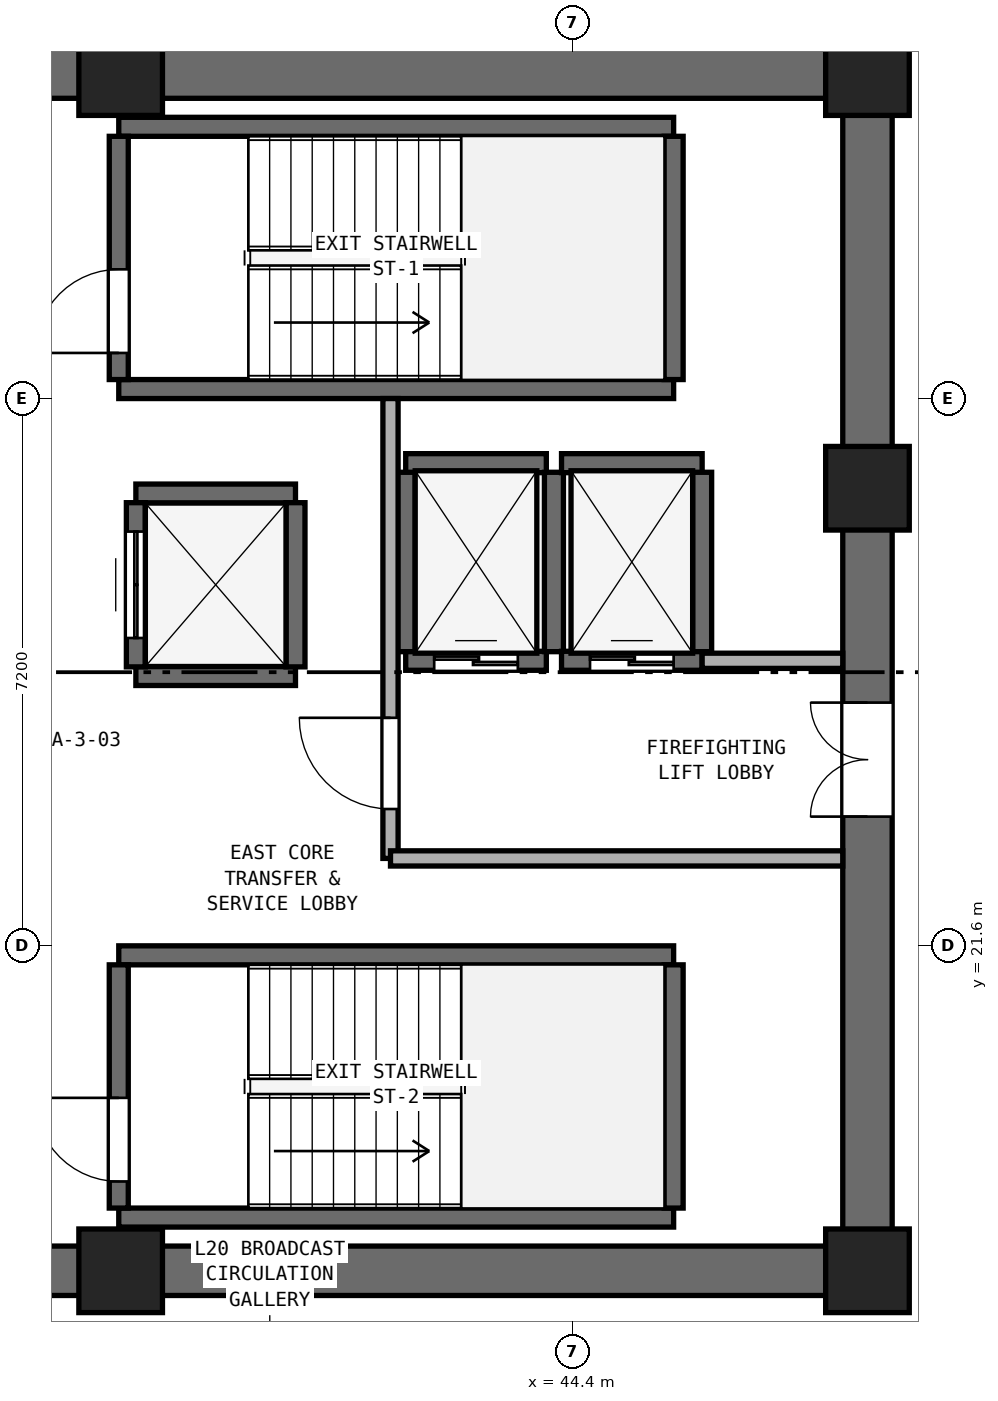
"""IFC4 building model, lengths in metres.
Left out: names, types, materials, properties, quantities, classifications, styles, units other than length and angle.
Written with IfcOpenShell. Run it as: python <this file> out.ifc"""

import sys

from ifc_helpers import new_model, si_unit, direction, frame, frame_2d, origin, origin_2d, place, context, subcontext, project, spatial, rectangle, extrude, element, fill, save


model = new_model("IFC4")
c1 = context("Model", 3, precision=1e-05, world=origin(), true_north=direction((0.0, 1.0)))
c2 = subcontext(c1, "Body", "Model", "MODEL_VIEW")
j1 = project(units=[si_unit("LENGTHUNIT", "METRE"), si_unit("PLANEANGLEUNIT", "RADIAN")], contexts=[c1])
p1 = place(None, origin())
s1 = spatial("IfcSite", under=j1, at=p1, CompositionType="ELEMENT")
p2 = place(p1, origin())
s2 = spatial("IfcBuilding", under=s1, at=p2, CompositionType="ELEMENT")
p3 = place(p2, frame((0.0, 0.0, 82.0)))
s3 = spatial("IfcBuildingStorey", under=s2, at=p3, CompositionType="ELEMENT", Elevation=82.0)
for number, where, z_axis, x_axis in (
    (1, (25.4, 17.325, 0.0), (0.0, 0.0, 1.0), (1.0, 0.0, 0.0)),
    (2, (25.4, 33.075, 0.0), (0.0, 0.0, 1.0), (1.0, 0.0, 0.0)),
):
    element("IfcWall", number, at=place(p3, frame(where, z_axis=z_axis, x_axis=x_axis)), inside=s3, PredefinedType="SHEAR", context=c2, shape_type="SweptSolid", body=[
        extrude(rectangle(XDim=23.2, YDim=0.65, at=frame_2d((11.6, 0.0))), origin(), (0.0, 0.0, 1.0), 3.525),
    ])
p4 = place(p3, frame((48.275, 17.65, 0.0), z_axis=(0.0, 0.0, 1.0), x_axis=(0.0, 1.0, 0.0)))
e3 = element("IfcWall", 3, at=p4, inside=s3, PredefinedType="SHEAR", context=c2, shape_type="SweptSolid", body=[
    extrude(rectangle(XDim=15.1, YDim=0.65, at=frame_2d((7.55, 0.0))), origin(), (0.0, 0.0, 1.0), 3.525),
])
p5 = place(p4, frame((5.65, 0.0, 0.0)))
e4 = element("IfcOpeningElement", 4, at=p5, cuts=e3, PredefinedType="OPENING", context=c2, shape_type="SweptSolid", body=[
    extrude(rectangle(XDim=1.5, YDim=2.15, at=frame_2d((0.75, 1.075))), frame((0.0, 0.335, 0.0), z_axis=(0.0, -1.0, 0.0), x_axis=(1.0, 0.0, 0.0)), (0.0, 0.0, 1.0), 0.67),
])
for number, where, z_axis, x_axis in (
    (5, (38.45, 17.325, 0.0), (0.0, 0.0, 1.0), (1.0, 0.0, 0.0)),
    (6, (48.275, 17.325, 0.0), (0.0, 0.0, 1.0), (1.0, 0.0, 0.0)),
    (7, (48.275, 27.62, 0.0), (0.0, 0.0, 1.0), (1.0, 0.0, 0.0)),
    (8, (48.275, 33.075, 0.0), (0.0, 0.0, 1.0), (1.0, 0.0, 0.0)),
    (9, (38.45, 33.075, 0.0), (0.0, 0.0, 1.0), (1.0, 0.0, 0.0)),
):
    element("IfcColumn", number, at=place(p3, frame(where, z_axis=z_axis, x_axis=x_axis)), inside=s3, PredefinedType="PILASTER", context=c2, shape_type="SweptSolid", body=[
        extrude(rectangle(XDim=1.1, YDim=1.1, at=origin_2d()), origin(), (0.0, 0.0, 1.0), 3.8),
    ])
for number, where, z_axis, x_axis in (
    (10, (38.425, 28.925, 0.0), (0.0, 0.0, 1.0), (1.0, 0.0, 0.0)),
    (11, (38.425, 32.375, 0.0), (0.0, 0.0, 1.0), (1.0, 0.0, 0.0)),
):
    element("IfcWall", number, at=place(p3, frame(where, z_axis=z_axis, x_axis=x_axis)), inside=s3, PredefinedType="SHEAR", context=c2, shape_type="SweptSolid", body=[
        extrude(rectangle(XDim=7.3, YDim=0.25, at=frame_2d((3.65, 0.0))), origin(), (0.0, 0.0, 1.0), 3.525),
    ])
p6 = place(p3, frame((38.425, 29.05, 0.0), z_axis=(0.0, 0.0, 1.0), x_axis=(0.0, 1.0, 0.0)))
e12 = element("IfcWall", 12, at=p6, inside=s3, PredefinedType="SHEAR", context=c2, shape_type="SweptSolid", body=[
    extrude(rectangle(XDim=3.2, YDim=0.25, at=frame_2d((1.6, 0.0))), origin(), (0.0, 0.0, 1.0), 3.525),
])
p7 = place(p6, frame((0.35, 0.0, 0.0)))
e13 = element("IfcOpeningElement", 13, at=p7, cuts=e12, PredefinedType="OPENING", context=c2, shape_type="SweptSolid", body=[
    extrude(rectangle(XDim=1.1, YDim=2.15, at=frame_2d((0.55, 1.075))), frame((0.0, 0.135, 0.0), z_axis=(0.0, -1.0, 0.0), x_axis=(1.0, 0.0, 0.0)), (0.0, 0.0, 1.0), 0.27),
])
p8 = place(p3, frame((45.725, 29.05, 0.0), z_axis=(0.0, 0.0, 1.0), x_axis=(0.0, 1.0, 0.0)))
e14 = element("IfcWall", 14, at=p8, inside=s3, PredefinedType="SHEAR", context=c2, shape_type="SweptSolid", body=[
    extrude(rectangle(XDim=3.2, YDim=0.25, at=frame_2d((1.6, 0.0))), origin(), (0.0, 0.0, 1.0), 3.525),
])
for number, where, z_axis, x_axis in (
    (15, (38.425, 18.025, 0.0), (0.0, 0.0, 1.0), (1.0, 0.0, 0.0)),
    (16, (38.425, 21.475, 0.0), (0.0, 0.0, 1.0), (1.0, 0.0, 0.0)),
):
    element("IfcWall", number, at=place(p3, frame(where, z_axis=z_axis, x_axis=x_axis)), inside=s3, PredefinedType="SHEAR", context=c2, shape_type="SweptSolid", body=[
        extrude(rectangle(XDim=7.3, YDim=0.25, at=frame_2d((3.65, 0.0))), origin(), (0.0, 0.0, 1.0), 3.525),
    ])
p9 = place(p3, frame((38.425, 18.15, 0.0), z_axis=(0.0, 0.0, 1.0), x_axis=(0.0, 1.0, 0.0)))
e17 = element("IfcWall", 17, at=p9, inside=s3, PredefinedType="SHEAR", context=c2, shape_type="SweptSolid", body=[
    extrude(rectangle(XDim=3.2, YDim=0.25, at=frame_2d((1.6, 0.0))), origin(), (0.0, 0.0, 1.0), 3.525),
])
p10 = place(p9, frame((0.35, 0.0, 0.0)))
e18 = element("IfcOpeningElement", 18, at=p10, cuts=e17, PredefinedType="OPENING", context=c2, shape_type="SweptSolid", body=[
    extrude(rectangle(XDim=1.1, YDim=2.15, at=frame_2d((0.55, 1.075))), frame((0.0, 0.135, 0.0), z_axis=(0.0, -1.0, 0.0), x_axis=(1.0, 0.0, 0.0)), (0.0, 0.0, 1.0), 0.27),
])
p11 = place(p3, frame((45.725, 18.15, 0.0), z_axis=(0.0, 0.0, 1.0), x_axis=(0.0, 1.0, 0.0)))
e19 = element("IfcWall", 19, at=p11, inside=s3, PredefinedType="SHEAR", context=c2, shape_type="SweptSolid", body=[
    extrude(rectangle(XDim=3.2, YDim=0.25, at=frame_2d((1.6, 0.0))), origin(), (0.0, 0.0, 1.0), 3.525),
])
p12 = place(p3, frame((42.2, 25.35, 0.0), z_axis=(0.0, 0.0, 1.0), x_axis=(1.0, 0.0, 0.0)))
e20 = element("IfcWall", 20, at=p12, inside=s3, PredefinedType="SHEAR", context=c2, shape_type="SweptSolid", body=[
    extrude(rectangle(XDim=1.85, YDim=0.25, at=frame_2d((0.925, 0.0))), origin(), (0.0, 0.0, 1.0), 3.525),
])
p13 = place(p12, frame((0.375, 0.0, 0.0)))
e21 = element("IfcOpeningElement", 21, at=p13, cuts=e20, PredefinedType="OPENING", context=c2, shape_type="SweptSolid", body=[
    extrude(rectangle(XDim=1.1, YDim=2.15, at=frame_2d((0.55, 1.075))), frame((0.0, 0.135, 0.0), z_axis=(0.0, -1.0, 0.0), x_axis=(1.0, 0.0, 0.0)), (0.0, 0.0, 1.0), 0.27),
])
p14 = place(p3, frame((42.2, 27.95, 0.0), z_axis=(0.0, 0.0, 1.0), x_axis=(1.0, 0.0, 0.0)))
e22 = element("IfcWall", 22, at=p14, inside=s3, PredefinedType="SHEAR", context=c2, shape_type="SweptSolid", body=[
    extrude(rectangle(XDim=1.85, YDim=0.25, at=frame_2d((0.925, 0.0))), origin(), (0.0, 0.0, 1.0), 3.525),
])
for number, where, z_axis, x_axis in (
    (23, (42.2, 25.47, 0.0), (0.0, 0.0, 1.0), (0.0, 1.0, 0.0)),
    (24, (44.15, 25.47, 0.0), (0.0, 0.0, 1.0), (0.0, 1.0, 0.0)),
):
    element("IfcWall", number, at=place(p3, frame(where, z_axis=z_axis, x_axis=x_axis)), inside=s3, PredefinedType="SHEAR", context=c2, shape_type="SweptSolid", body=[
        extrude(rectangle(XDim=2.36, YDim=0.25, at=frame_2d((1.18, 0.0))), origin(), (0.0, 0.0, 1.0), 3.525),
    ])
p15 = place(p3, frame((44.25, 25.35, 0.0), z_axis=(0.0, 0.0, 1.0), x_axis=(1.0, 0.0, 0.0)))
e25 = element("IfcWall", 25, at=p15, inside=s3, PredefinedType="SHEAR", context=c2, shape_type="SweptSolid", body=[
    extrude(rectangle(XDim=1.85, YDim=0.25, at=frame_2d((0.925, 0.0))), origin(), (0.0, 0.0, 1.0), 3.525),
])
p16 = place(p15, frame((0.375, 0.0, 0.0)))
e26 = element("IfcOpeningElement", 26, at=p16, cuts=e25, PredefinedType="OPENING", context=c2, shape_type="SweptSolid", body=[
    extrude(rectangle(XDim=1.1, YDim=2.15, at=frame_2d((0.55, 1.075))), frame((0.0, 0.135, 0.0), z_axis=(0.0, -1.0, 0.0), x_axis=(1.0, 0.0, 0.0)), (0.0, 0.0, 1.0), 0.27),
])
p17 = place(p3, frame((44.25, 27.95, 0.0), z_axis=(0.0, 0.0, 1.0), x_axis=(1.0, 0.0, 0.0)))
e27 = element("IfcWall", 27, at=p17, inside=s3, PredefinedType="SHEAR", context=c2, shape_type="SweptSolid", body=[
    extrude(rectangle(XDim=1.85, YDim=0.25, at=frame_2d((0.925, 0.0))), origin(), (0.0, 0.0, 1.0), 3.525),
])
p18 = place(p3, frame((46.1, 25.47, 0.0), z_axis=(0.0, 0.0, 1.0), x_axis=(0.0, 1.0, 0.0)))
e28 = element("IfcWall", 28, at=p18, inside=s3, PredefinedType="SHEAR", context=c2, shape_type="SweptSolid", body=[
    extrude(rectangle(XDim=2.36, YDim=0.25, at=frame_2d((1.18, 0.0))), origin(), (0.0, 0.0, 1.0), 3.525),
])
for number, where, z_axis, x_axis in (
    (29, (38.65, 25.15, 0.0), (0.0, 0.0, 1.0), (1.0, 0.0, 0.0)),
    (30, (38.65, 27.55, 0.0), (0.0, 0.0, 1.0), (1.0, 0.0, 0.0)),
):
    element("IfcWall", number, at=place(p3, frame(where, z_axis=z_axis, x_axis=x_axis)), inside=s3, PredefinedType="SHEAR", context=c2, shape_type="SweptSolid", body=[
        extrude(rectangle(XDim=2.1, YDim=0.25, at=frame_2d((1.05, 0.0))), origin(), (0.0, 0.0, 1.0), 3.525),
    ])
p19 = place(p3, frame((38.65, 25.27, 0.0), z_axis=(0.0, 0.0, 1.0), x_axis=(0.0, 1.0, 0.0)))
e31 = element("IfcWall", 31, at=p19, inside=s3, PredefinedType="SHEAR", context=c2, shape_type="SweptSolid", body=[
    extrude(rectangle(XDim=2.16, YDim=0.25, at=frame_2d((1.08, 0.0))), origin(), (0.0, 0.0, 1.0), 3.525),
])
p20 = place(p19, frame((0.38, 0.0, 0.0)))
e32 = element("IfcOpeningElement", 32, at=p20, cuts=e31, PredefinedType="OPENING", context=c2, shape_type="SweptSolid", body=[
    extrude(rectangle(XDim=1.4, YDim=2.2, at=frame_2d((0.7, 1.1))), frame((0.0, 0.135, 0.0), z_axis=(0.0, -1.0, 0.0), x_axis=(1.0, 0.0, 0.0)), (0.0, 0.0, 1.0), 0.27),
])
p21 = place(p3, frame((40.75, 25.27, 0.0), z_axis=(0.0, 0.0, 1.0), x_axis=(0.0, 1.0, 0.0)))
e33 = element("IfcWall", 33, at=p21, inside=s3, PredefinedType="SHEAR", context=c2, shape_type="SweptSolid", body=[
    extrude(rectangle(XDim=2.16, YDim=0.25, at=frame_2d((1.08, 0.0))), origin(), (0.0, 0.0, 1.0), 3.525),
])
p22 = place(p3, frame((42.0, 22.75, 0.0), z_axis=(0.0, 0.0, 1.0), x_axis=(0.0, 1.0, 0.0)))
e34 = element("IfcWall", 34, at=p22, inside=s3, PredefinedType="SOLIDWALL", context=c2, shape_type="SweptSolid", body=[
    extrude(rectangle(XDim=6.05, YDim=0.2, at=frame_2d((3.025, 0.0))), origin(), (0.0, 0.0, 1.0), 3.525),
])
p23 = place(p22, frame((0.65, 0.0, 0.0)))
e35 = element("IfcOpeningElement", 35, at=p23, cuts=e34, PredefinedType="OPENING", context=c2, shape_type="SweptSolid", body=[
    extrude(rectangle(XDim=1.2, YDim=2.15, at=frame_2d((0.6, 1.075))), frame((0.0, 0.11, 0.0), z_axis=(0.0, -1.0, 0.0), x_axis=(1.0, 0.0, 0.0)), (0.0, 0.0, 1.0), 0.22),
])
p24 = place(p3, frame((42.0, 22.75, 0.0), z_axis=(0.0, 0.0, 1.0), x_axis=(1.0, 0.0, 0.0)))
e36 = element("IfcWall", 36, at=p24, inside=s3, PredefinedType="SOLIDWALL", context=c2, shape_type="SweptSolid", body=[
    extrude(rectangle(XDim=5.95, YDim=0.2, at=frame_2d((2.975, 0.0))), origin(), (0.0, 0.0, 1.0), 3.525),
])
p25 = place(p3, frame((46.1, 25.35, 0.0), z_axis=(0.0, 0.0, 1.0), x_axis=(1.0, 0.0, 0.0)))
e37 = element("IfcWall", 37, at=p25, inside=s3, PredefinedType="SOLIDWALL", context=c2, shape_type="SweptSolid", body=[
    extrude(rectangle(XDim=1.85, YDim=0.2, at=frame_2d((0.925, 0.0))), origin(), (0.0, 0.0, 1.0), 3.525),
])
p26 = place(p7, origin())
e38 = element("IfcDoor", 38, at=p26, inside=s3, OperationType="SINGLE_SWING_LEFT", PredefinedType="DOOR", context=c2, shape_type="SweptSolid", body=[
    extrude(rectangle(XDim=1.1, YDim=2.15, at=frame_2d((0.55, 1.075))), frame((0.0, 0.025, 0.0), z_axis=(0.0, -1.0, 0.0), x_axis=(1.0, 0.0, 0.0)), (0.0, 0.0, 1.0), 0.05),
])
fill(e13, e38)
p27 = place(p10, origin())
e39 = element("IfcDoor", 39, at=p27, inside=s3, OperationType="SINGLE_SWING_RIGHT", PredefinedType="DOOR", context=c2, shape_type="SweptSolid", body=[
    extrude(rectangle(XDim=1.1, YDim=2.15, at=frame_2d((0.55, 1.075))), frame((0.0, 0.025, 0.0), z_axis=(0.0, -1.0, 0.0), x_axis=(1.0, 0.0, 0.0)), (0.0, 0.0, 1.0), 0.05),
])
fill(e18, e39)
p28 = place(p13, origin())
e40 = element("IfcDoor", 40, at=p28, inside=s3, OperationType="DOUBLE_DOOR_SLIDING", PredefinedType="DOOR", context=c2, shape_type="SweptSolid", body=[
    extrude(rectangle(XDim=1.1, YDim=2.15, at=frame_2d((0.55, 1.075))), frame((0.0, 0.025, 0.0), z_axis=(0.0, -1.0, 0.0), x_axis=(1.0, 0.0, 0.0)), (0.0, 0.0, 1.0), 0.05),
])
fill(e21, e40)
p29 = place(p16, origin())
e41 = element("IfcDoor", 41, at=p29, inside=s3, OperationType="DOUBLE_DOOR_SLIDING", PredefinedType="DOOR", context=c2, shape_type="SweptSolid", body=[
    extrude(rectangle(XDim=1.1, YDim=2.15, at=frame_2d((0.55, 1.075))), frame((0.0, 0.025, 0.0), z_axis=(0.0, -1.0, 0.0), x_axis=(1.0, 0.0, 0.0)), (0.0, 0.0, 1.0), 0.05),
])
fill(e26, e41)
p30 = place(p20, origin())
e42 = element("IfcDoor", 42, at=p30, inside=s3, OperationType="DOUBLE_DOOR_SLIDING", PredefinedType="DOOR", context=c2, shape_type="SweptSolid", body=[
    extrude(rectangle(XDim=1.4, YDim=2.2, at=frame_2d((0.7, 1.1))), frame((0.0, 0.025, 0.0), z_axis=(0.0, -1.0, 0.0), x_axis=(1.0, 0.0, 0.0)), (0.0, 0.0, 1.0), 0.05),
])
fill(e32, e42)
p31 = place(p23, origin())
e43 = element("IfcDoor", 43, at=p31, inside=s3, OperationType="SINGLE_SWING_RIGHT", PredefinedType="DOOR", context=c2, shape_type="SweptSolid", body=[
    extrude(rectangle(XDim=1.2, YDim=2.15, at=frame_2d((0.6, 1.075))), frame((0.0, 0.025, 0.0), z_axis=(0.0, -1.0, 0.0), x_axis=(1.0, 0.0, 0.0)), (0.0, 0.0, 1.0), 0.05),
])
fill(e35, e43)
p32 = place(p5, origin())
e44 = element("IfcDoor", 44, at=p32, inside=s3, OperationType="DOUBLE_DOOR_SINGLE_SWING", PredefinedType="DOOR", context=c2, shape_type="SweptSolid", body=[
    extrude(rectangle(XDim=1.5, YDim=2.15, at=frame_2d((0.75, 1.075))), frame((0.0, 0.025, 0.0), z_axis=(0.0, -1.0, 0.0), x_axis=(1.0, 0.0, 0.0)), (0.0, 0.0, 1.0), 0.05),
])
fill(e4, e44)
save(model, sys.argv[1])
